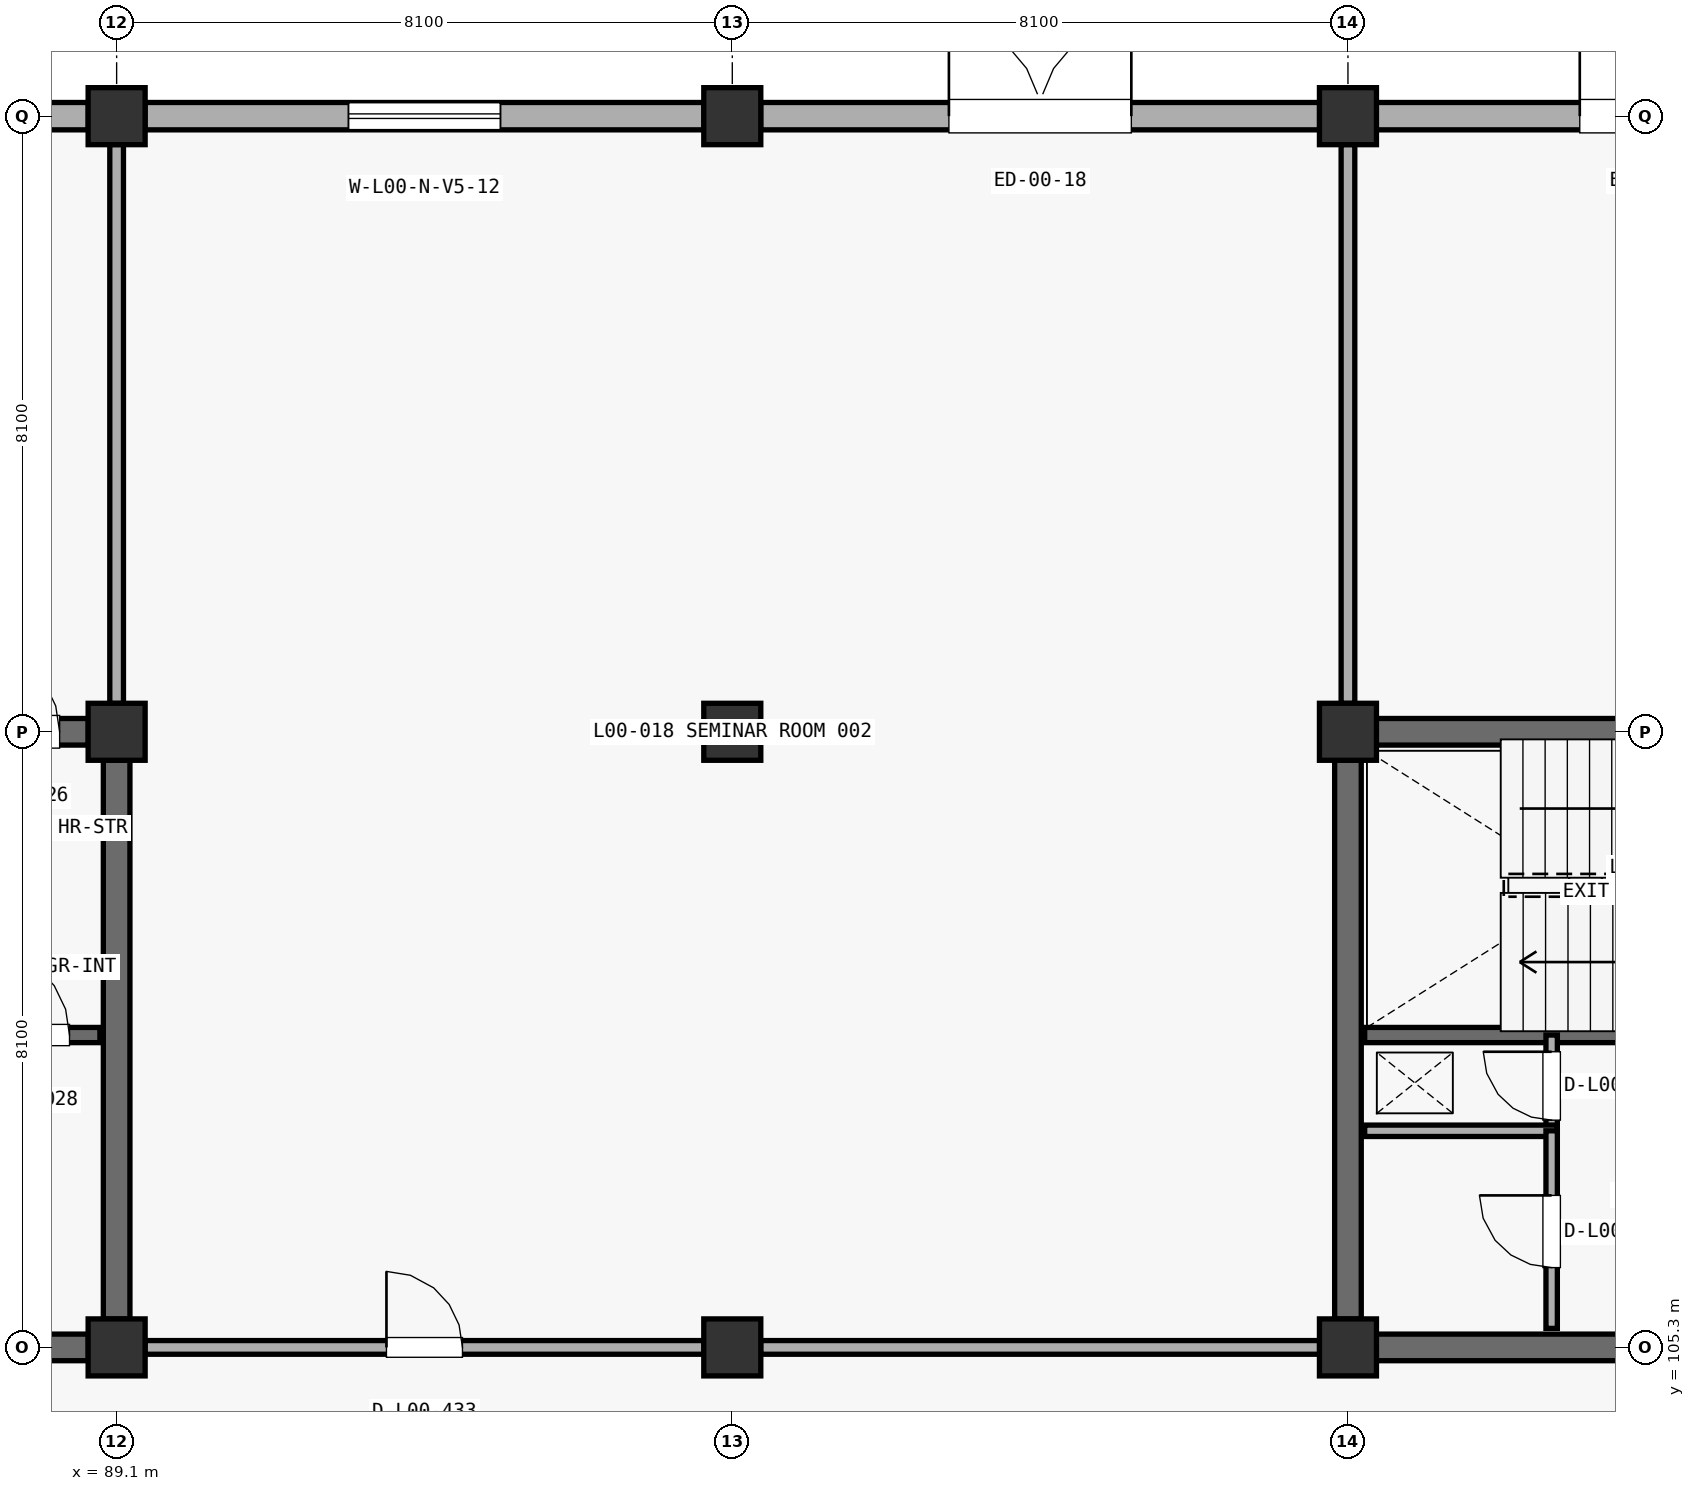
"""IFC4 building model, lengths in metres.
Left out: names, types, materials, properties, quantities, classifications, styles, units other than length and angle.
Written with IfcOpenShell. Run it as: python <this file> out.ifc"""

import sys

from ifc_helpers import new_model, si_unit, direction, frame, frame_2d, origin, origin_2d, place, context, subcontext, project, spatial, rectangle, extrude, element, fill, save


model = new_model("IFC4")
c1 = context("Model", 3, precision=1e-05, world=origin(), true_north=direction((0.0, 1.0)))
c2 = subcontext(c1, "Body", "Model", "MODEL_VIEW")
j1 = project(units=[si_unit("LENGTHUNIT", "METRE"), si_unit("PLANEANGLEUNIT", "RADIAN")], contexts=[c1])
p1 = place(None, origin())
s1 = spatial("IfcSite", under=j1, at=p1, CompositionType="ELEMENT")
p2 = place(p1, origin())
s2 = spatial("IfcBuilding", under=s1, at=p2, CompositionType="ELEMENT")
p3 = place(p2, origin())
s3 = spatial("IfcBuildingStorey", under=s2, at=p3, CompositionType="ELEMENT", Elevation=0.0)
for number, where, z_axis, x_axis in (
    (1, (89.1, 105.3, 0.0), (0.0, 0.0, 1.0), (1.0, 0.0, 0.0)),
    (2, (89.1, 113.4, 0.0), (0.0, 0.0, 1.0), (1.0, 0.0, 0.0)),
    (3, (89.1, 121.5, 0.0), (0.0, 0.0, 1.0), (1.0, 0.0, 0.0)),
    (4, (97.2, 105.3, 0.0), (0.0, 0.0, 1.0), (1.0, 0.0, 0.0)),
    (5, (97.2, 113.4, 0.0), (0.0, 0.0, 1.0), (1.0, 0.0, 0.0)),
    (6, (97.2, 121.5, 0.0), (0.0, 0.0, 1.0), (1.0, 0.0, 0.0)),
    (7, (105.3, 105.3, 0.0), (0.0, 0.0, 1.0), (1.0, 0.0, 0.0)),
    (8, (105.3, 113.4, 0.0), (0.0, 0.0, 1.0), (1.0, 0.0, 0.0)),
    (9, (105.3, 121.5, 0.0), (0.0, 0.0, 1.0), (1.0, 0.0, 0.0)),
):
    element("IfcColumn", number, at=place(p3, frame(where, z_axis=z_axis, x_axis=x_axis)), inside=s3, PredefinedType="COLUMN", context=c2, shape_type="SweptSolid", body=[
        extrude(rectangle(XDim=0.75, YDim=0.75, at=origin_2d()), origin(), (0.0, 0.0, 1.0), 5.1),
    ])
p4 = place(p3, frame((81.373, 121.5, 0.0), z_axis=(0.0, 0.0, 1.0), x_axis=(1.0, 0.0, 0.0)))
e10 = element("IfcWall", 10, at=p4, inside=s3, PredefinedType="STANDARD", context=c2, shape_type="SweptSolid", body=[
    extrude(rectangle(XDim=7.354, YDim=0.36, at=frame_2d((3.677, 0.0))), origin(), (0.0, 0.0, 1.0), 4.172),
])
p5 = place(p4, frame((2.677, 0.0, 0.0)))
e11 = element("IfcOpeningElement", 11, at=p5, cuts=e10, PredefinedType="OPENING", context=c2, shape_type="SweptSolid", body=[
    extrude(rectangle(XDim=2.0, YDim=2.2, at=frame_2d((1.0, 1.1))), frame((0.0, 0.19, 0.0), z_axis=(0.0, -1.0, 0.0), x_axis=(1.0, 0.0, 0.0)), (0.0, 0.0, 1.0), 0.38),
])
p6 = place(p3, frame((89.473, 121.5, 0.0), z_axis=(0.0, 0.0, 1.0), x_axis=(1.0, 0.0, 0.0)))
e12 = element("IfcWall", 12, at=p6, inside=s3, PredefinedType="STANDARD", context=c2, shape_type="SweptSolid", body=[
    extrude(rectangle(XDim=7.354, YDim=0.36, at=frame_2d((3.677, 0.0))), origin(), (0.0, 0.0, 1.0), 4.222),
])
p7 = place(p6, frame((2.677, 0.0, 0.85)))
e13 = element("IfcOpeningElement", 13, at=p7, cuts=e12, PredefinedType="OPENING", context=c2, shape_type="SweptSolid", body=[
    extrude(rectangle(XDim=2.0, YDim=1.4, at=frame_2d((1.0, 0.7))), frame((0.0, 0.19, 0.0), z_axis=(0.0, -1.0, 0.0), x_axis=(1.0, 0.0, 0.0)), (0.0, 0.0, 1.0), 0.38),
])
p8 = place(p3, frame((97.573, 121.5, 0.0), z_axis=(0.0, 0.0, 1.0), x_axis=(1.0, 0.0, 0.0)))
e14 = element("IfcWall", 14, at=p8, inside=s3, PredefinedType="STANDARD", context=c2, shape_type="SweptSolid", body=[
    extrude(rectangle(XDim=7.354, YDim=0.36, at=frame_2d((3.677, 0.0))), origin(), (0.0, 0.0, 1.0), 4.172),
])
p9 = place(p8, frame((2.477, 0.0, 0.0)))
e15 = element("IfcOpeningElement", 15, at=p9, cuts=e14, PredefinedType="OPENING", context=c2, shape_type="SweptSolid", body=[
    extrude(rectangle(XDim=2.4, YDim=2.4, at=frame_2d((1.2, 1.2))), frame((0.0, 0.19, 0.0), z_axis=(0.0, -1.0, 0.0), x_axis=(1.0, 0.0, 0.0)), (0.0, 0.0, 1.0), 0.38),
])
p10 = place(p3, frame((105.673, 121.5, 0.0), z_axis=(0.0, 0.0, 1.0), x_axis=(1.0, 0.0, 0.0)))
e16 = element("IfcWall", 16, at=p10, inside=s3, PredefinedType="STANDARD", context=c2, shape_type="SweptSolid", body=[
    extrude(rectangle(XDim=7.354, YDim=0.36, at=frame_2d((3.677, 0.0))), origin(), (0.0, 0.0, 1.0), 3.872),
])
p11 = place(p10, frame((2.677, 0.0, 0.0)))
e17 = element("IfcOpeningElement", 17, at=p11, cuts=e16, PredefinedType="OPENING", context=c2, shape_type="SweptSolid", body=[
    extrude(rectangle(XDim=2.0, YDim=2.2, at=frame_2d((1.0, 1.1))), frame((0.0, 0.19, 0.0), z_axis=(0.0, -1.0, 0.0), x_axis=(1.0, 0.0, 0.0)), (0.0, 0.0, 1.0), 0.38),
])
p12 = place(p3, frame((81.373, 113.4, 0.0), z_axis=(0.0, 0.0, 1.0), x_axis=(1.0, 0.0, 0.0)))
e18 = element("IfcWall", 18, at=p12, inside=s3, PredefinedType="SHEAR", context=c2, shape_type="SweptSolid", body=[
    extrude(rectangle(XDim=7.354, YDim=0.35, at=frame_2d((3.677, 0.0))), origin(), (0.0, 0.0, 1.0), 4.822),
])
p13 = place(p12, frame((5.827, 0.0, 0.0)))
e19 = element("IfcOpeningElement", 19, at=p13, cuts=e18, PredefinedType="OPENING", context=c2, shape_type="SweptSolid", body=[
    extrude(rectangle(XDim=1.15, YDim=2.2, at=frame_2d((0.575, 1.1))), frame((0.0, 0.185, 0.0), z_axis=(0.0, -1.0, 0.0), x_axis=(1.0, 0.0, 0.0)), (0.0, 0.0, 1.0), 0.37),
])
p14 = place(p3, frame((89.1, 105.673, 0.0), z_axis=(0.0, 0.0, 1.0), x_axis=(0.0, 1.0, 0.0)))
e20 = element("IfcWall", 20, at=p14, inside=s3, PredefinedType="SHEAR", context=c2, shape_type="SweptSolid", body=[
    extrude(rectangle(XDim=7.354, YDim=0.35, at=frame_2d((3.677, 0.0))), origin(), (0.0, 0.0, 1.0), 4.822),
])
p15 = place(p3, frame((81.373, 105.3, 0.0), z_axis=(0.0, 0.0, 1.0), x_axis=(1.0, 0.0, 0.0)))
e21 = element("IfcWall", 21, at=p15, inside=s3, PredefinedType="SHEAR", context=c2, shape_type="SweptSolid", body=[
    extrude(rectangle(XDim=7.354, YDim=0.35, at=frame_2d((3.677, 0.0))), origin(), (0.0, 0.0, 1.0), 4.822),
])
p16 = place(p15, frame((5.104, 0.0, 0.0)))
e22 = element("IfcOpeningElement", 22, at=p16, cuts=e21, PredefinedType="OPENING", context=c2, shape_type="SweptSolid", body=[
    extrude(rectangle(XDim=1.2, YDim=2.2, at=frame_2d((0.6, 1.1))), frame((0.0, 0.185, 0.0), z_axis=(0.0, -1.0, 0.0), x_axis=(1.0, 0.0, 0.0)), (0.0, 0.0, 1.0), 0.37),
])
p17 = place(p3, frame((81.22, 109.41, 0.0), z_axis=(0.0, 0.0, 1.0), x_axis=(1.0, 0.0, 0.0)))
e23 = element("IfcWall", 23, at=p17, inside=s3, PredefinedType="SHEAR", context=c2, shape_type="SweptSolid", body=[
    extrude(rectangle(XDim=7.66, YDim=0.2, at=frame_2d((3.83, 0.0))), origin(), (0.0, 0.0, 1.0), 4.822),
])
p18 = place(p17, frame((6.11, 0.0, 0.0)))
e24 = element("IfcOpeningElement", 24, at=p18, cuts=e23, PredefinedType="OPENING", context=c2, shape_type="SweptSolid", body=[
    extrude(rectangle(XDim=1.15, YDim=2.2, at=frame_2d((0.575, 1.1))), frame((0.0, 0.11, 0.0), z_axis=(0.0, -1.0, 0.0), x_axis=(1.0, 0.0, 0.0)), (0.0, 0.0, 1.0), 0.22),
])
p19 = place(p3, frame((105.673, 113.4, 0.0), z_axis=(0.0, 0.0, 1.0), x_axis=(1.0, 0.0, 0.0)))
e25 = element("IfcWall", 25, at=p19, inside=s3, PredefinedType="SHEAR", context=c2, shape_type="SweptSolid", body=[
    extrude(rectangle(XDim=7.354, YDim=0.35, at=frame_2d((3.677, 0.0))), origin(), (0.0, 0.0, 1.0), 4.822),
])
p20 = place(p19, frame((5.827, 0.0, 0.0)))
e26 = element("IfcOpeningElement", 26, at=p20, cuts=e25, PredefinedType="OPENING", context=c2, shape_type="SweptSolid", body=[
    extrude(rectangle(XDim=1.15, YDim=2.2, at=frame_2d((0.575, 1.1))), frame((0.0, 0.185, 0.0), z_axis=(0.0, -1.0, 0.0), x_axis=(1.0, 0.0, 0.0)), (0.0, 0.0, 1.0), 0.37),
])
p21 = place(p3, frame((105.3, 105.673, 0.0), z_axis=(0.0, 0.0, 1.0), x_axis=(0.0, 1.0, 0.0)))
e27 = element("IfcWall", 27, at=p21, inside=s3, PredefinedType="SHEAR", context=c2, shape_type="SweptSolid", body=[
    extrude(rectangle(XDim=7.354, YDim=0.35, at=frame_2d((3.677, 0.0))), origin(), (0.0, 0.0, 1.0), 4.822),
])
p22 = place(p3, frame((105.673, 105.3, 0.0), z_axis=(0.0, 0.0, 1.0), x_axis=(1.0, 0.0, 0.0)))
e28 = element("IfcWall", 28, at=p22, inside=s3, PredefinedType="SHEAR", context=c2, shape_type="SweptSolid", body=[
    extrude(rectangle(XDim=7.354, YDim=0.35, at=frame_2d((3.677, 0.0))), origin(), (0.0, 0.0, 1.0), 4.822),
])
p23 = place(p22, frame((5.104, 0.0, 0.0)))
e29 = element("IfcOpeningElement", 29, at=p23, cuts=e28, PredefinedType="OPENING", context=c2, shape_type="SweptSolid", body=[
    extrude(rectangle(XDim=1.2, YDim=2.2, at=frame_2d((0.6, 1.1))), frame((0.0, 0.185, 0.0), z_axis=(0.0, -1.0, 0.0), x_axis=(1.0, 0.0, 0.0)), (0.0, 0.0, 1.0), 0.37),
])
p24 = place(p3, frame((105.52, 109.41, 0.0), z_axis=(0.0, 0.0, 1.0), x_axis=(1.0, 0.0, 0.0)))
e30 = element("IfcWall", 30, at=p24, inside=s3, PredefinedType="SHEAR", context=c2, shape_type="SweptSolid", body=[
    extrude(rectangle(XDim=7.66, YDim=0.2, at=frame_2d((3.83, 0.0))), origin(), (0.0, 0.0, 1.0), 4.822),
])
p25 = place(p24, frame((6.11, 0.0, 0.0)))
e31 = element("IfcOpeningElement", 31, at=p25, cuts=e30, PredefinedType="OPENING", context=c2, shape_type="SweptSolid", body=[
    extrude(rectangle(XDim=1.15, YDim=2.2, at=frame_2d((0.575, 1.1))), frame((0.0, 0.11, 0.0), z_axis=(0.0, -1.0, 0.0), x_axis=(1.0, 0.0, 0.0)), (0.0, 0.0, 1.0), 0.22),
])
p26 = place(p3, frame((107.98, 108.15, 0.0), z_axis=(0.0, 0.0, 1.0), x_axis=(0.0, 1.0, 0.0)))
e32 = element("IfcWall", 32, at=p26, inside=s3, PredefinedType="PARTITIONING", context=c2, shape_type="SweptSolid", body=[
    extrude(rectangle(XDim=1.26, YDim=0.15, at=frame_2d((0.63, 0.0))), origin(), (0.0, 0.0, 1.0), 4.822),
])
p27 = place(p26, frame((0.14, 0.0, 0.0)))
e33 = element("IfcOpeningElement", 33, at=p27, cuts=e32, PredefinedType="OPENING", context=c2, shape_type="SweptSolid", body=[
    extrude(rectangle(XDim=0.9, YDim=2.15, at=frame_2d((0.45, 1.075))), frame((0.0, 0.085, 0.0), z_axis=(0.0, -1.0, 0.0), x_axis=(1.0, 0.0, 0.0)), (0.0, 0.0, 1.0), 0.17),
])
p28 = place(p3, frame((105.52, 108.15, 0.0), z_axis=(0.0, 0.0, 1.0), x_axis=(1.0, 0.0, 0.0)))
e34 = element("IfcWall", 34, at=p28, inside=s3, PredefinedType="PARTITIONING", context=c2, shape_type="SweptSolid", body=[
    extrude(rectangle(XDim=2.53, YDim=0.15, at=frame_2d((1.265, 0.0))), origin(), (0.0, 0.0, 1.0), 4.822),
])
p29 = place(p3, frame((107.98, 105.55, 0.0), z_axis=(0.0, 0.0, 1.0), x_axis=(0.0, 1.0, 0.0)))
e35 = element("IfcWall", 35, at=p29, inside=s3, PredefinedType="PARTITIONING", context=c2, shape_type="SweptSolid", body=[
    extrude(rectangle(XDim=2.6, YDim=0.15, at=frame_2d((1.3, 0.0))), origin(), (0.0, 0.0, 1.0), 4.822),
])
p30 = place(p29, frame((0.8, 0.0, 0.0)))
e36 = element("IfcOpeningElement", 36, at=p30, cuts=e35, PredefinedType="OPENING", context=c2, shape_type="SweptSolid", body=[
    extrude(rectangle(XDim=0.95, YDim=2.15, at=frame_2d((0.475, 1.075))), frame((0.0, 0.085, 0.0), z_axis=(0.0, -1.0, 0.0), x_axis=(1.0, 0.0, 0.0)), (0.0, 0.0, 1.0), 0.17),
])
p31 = place(p3, frame((89.473, 105.3, 0.0), z_axis=(0.0, 0.0, 1.0), x_axis=(1.0, 0.0, 0.0)))
e37 = element("IfcWall", 37, at=p31, inside=s3, PredefinedType="PARTITIONING", context=c2, shape_type="SweptSolid", body=[
    extrude(rectangle(XDim=7.354, YDim=0.18, at=frame_2d((3.677, 0.0))), origin(), (0.0, 0.0, 1.0), 4.072),
])
p32 = place(p31, frame((3.177, 0.0, 0.0)))
e38 = element("IfcOpeningElement", 38, at=p32, cuts=e37, PredefinedType="OPENING", context=c2, shape_type="SweptSolid", body=[
    extrude(rectangle(XDim=1.0, YDim=2.15, at=frame_2d((0.5, 1.075))), frame((0.0, 0.1, 0.0), z_axis=(0.0, -1.0, 0.0), x_axis=(1.0, 0.0, 0.0)), (0.0, 0.0, 1.0), 0.2),
])
for number, where, z_axis, x_axis in (
    (39, (97.573, 105.3, 0.0), (0.0, 0.0, 1.0), (1.0, 0.0, 0.0)),
    (40, (105.3, 113.773, 0.0), (0.0, 0.0, 1.0), (0.0, 1.0, 0.0)),
):
    element("IfcWall", number, at=place(p3, frame(where, z_axis=z_axis, x_axis=x_axis)), inside=s3, PredefinedType="PARTITIONING", context=c2, shape_type="SweptSolid", body=[
        extrude(rectangle(XDim=7.354, YDim=0.18, at=frame_2d((3.677, 0.0))), origin(), (0.0, 0.0, 1.0), 4.172),
    ])
p33 = place(p3, frame((89.1, 113.773, 0.0), z_axis=(0.0, 0.0, 1.0), x_axis=(0.0, 1.0, 0.0)))
e41 = element("IfcWall", 41, at=p33, inside=s3, PredefinedType="PARTITIONING", context=c2, shape_type="SweptSolid", body=[
    extrude(rectangle(XDim=7.354, YDim=0.18, at=frame_2d((3.677, 0.0))), origin(), (0.0, 0.0, 1.0), 4.222),
])
p34 = place(p7, origin())
e42 = element("IfcWindow", 42, at=p34, inside=s3, PartitioningType="SINGLE_PANEL", PredefinedType="WINDOW", context=c2, shape_type="SweptSolid", body=[
    extrude(rectangle(XDim=2.0, YDim=1.4, at=frame_2d((1.0, 0.7))), frame((0.0, 0.03, 0.0), z_axis=(0.0, -1.0, 0.0), x_axis=(1.0, 0.0, 0.0)), (0.0, 0.0, 1.0), 0.06),
])
fill(e13, e42)
p35 = place(p9, origin())
e43 = element("IfcDoor", 43, at=p35, inside=s3, OperationType="DOUBLE_SWING_RIGHT", PredefinedType="DOOR", context=c2, shape_type="SweptSolid", body=[
    extrude(rectangle(XDim=2.4, YDim=2.4, at=frame_2d((1.2, 1.2))), frame((0.0, 0.025, 0.0), z_axis=(0.0, -1.0, 0.0), x_axis=(1.0, 0.0, 0.0)), (0.0, 0.0, 1.0), 0.05),
])
fill(e15, e43)
p36 = place(p11, origin())
e44 = element("IfcDoor", 44, at=p36, inside=s3, OperationType="DOUBLE_SWING_LEFT", PredefinedType="DOOR", context=c2, shape_type="SweptSolid", body=[
    extrude(rectangle(XDim=2.0, YDim=2.2, at=frame_2d((1.0, 1.1))), frame((0.0, 0.025, 0.0), z_axis=(0.0, -1.0, 0.0), x_axis=(1.0, 0.0, 0.0)), (0.0, 0.0, 1.0), 0.05),
])
fill(e17, e44)
p37 = place(p13, origin())
e45 = element("IfcDoor", 45, at=p37, inside=s3, OperationType="SINGLE_SWING_LEFT", PredefinedType="DOOR", context=c2, shape_type="SweptSolid", body=[
    extrude(rectangle(XDim=1.15, YDim=2.2, at=frame_2d((0.575, 1.1))), frame((0.0, 0.025, 0.0), z_axis=(0.0, -1.0, 0.0), x_axis=(1.0, 0.0, 0.0)), (0.0, 0.0, 1.0), 0.05),
])
fill(e19, e45)
p38 = place(p18, origin())
e46 = element("IfcDoor", 46, at=p38, inside=s3, OperationType="SINGLE_SWING_LEFT", PredefinedType="DOOR", context=c2, shape_type="SweptSolid", body=[
    extrude(rectangle(XDim=1.15, YDim=2.2, at=frame_2d((0.575, 1.1))), frame((0.0, 0.025, 0.0), z_axis=(0.0, -1.0, 0.0), x_axis=(1.0, 0.0, 0.0)), (0.0, 0.0, 1.0), 0.05),
])
fill(e24, e46)
p39 = place(p27, origin())
e47 = element("IfcDoor", 47, at=p39, inside=s3, OperationType="SINGLE_SWING_RIGHT", PredefinedType="DOOR", context=c2, shape_type="SweptSolid", body=[
    extrude(rectangle(XDim=0.9, YDim=2.15, at=frame_2d((0.45, 1.075))), frame((0.0, 0.025, 0.0), z_axis=(0.0, -1.0, 0.0), x_axis=(1.0, 0.0, 0.0)), (0.0, 0.0, 1.0), 0.05),
])
fill(e33, e47)
p40 = place(p30, origin())
e48 = element("IfcDoor", 48, at=p40, inside=s3, OperationType="SINGLE_SWING_RIGHT", PredefinedType="DOOR", context=c2, shape_type="SweptSolid", body=[
    extrude(rectangle(XDim=0.95, YDim=2.15, at=frame_2d((0.475, 1.075))), frame((0.0, 0.025, 0.0), z_axis=(0.0, -1.0, 0.0), x_axis=(1.0, 0.0, 0.0)), (0.0, 0.0, 1.0), 0.05),
])
fill(e36, e48)
p41 = place(p32, origin())
e49 = element("IfcDoor", 49, at=p41, inside=s3, OperationType="SINGLE_SWING_LEFT", PredefinedType="DOOR", context=c2, shape_type="SweptSolid", body=[
    extrude(rectangle(XDim=1.0, YDim=2.15, at=frame_2d((0.5, 1.075))), frame((0.0, 0.025, 0.0), z_axis=(0.0, -1.0, 0.0), x_axis=(1.0, 0.0, 0.0)), (0.0, 0.0, 1.0), 0.05),
])
fill(e38, e49)
save(model, sys.argv[1])
